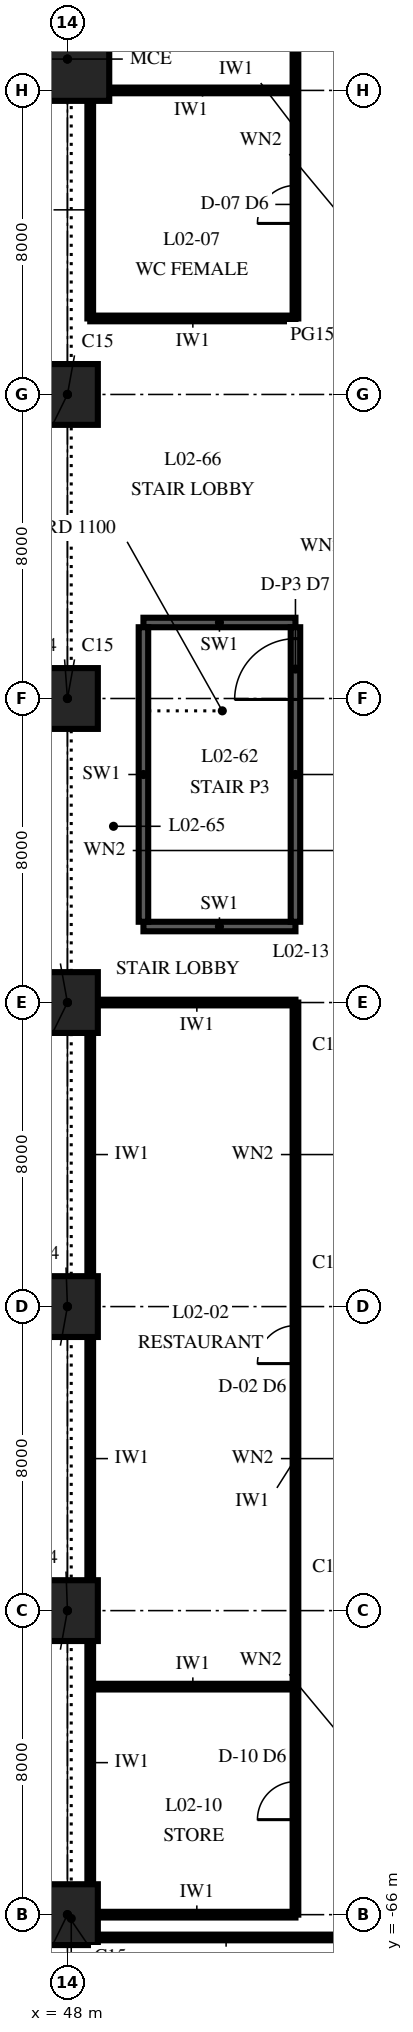
"""IFC4 building model, lengths in metres.
Left out: names, types, materials, properties, quantities, classifications, styles, units other than length and angle.
Written with IfcOpenShell. Run it as: python <this file> out.ifc"""

import sys

from ifc_helpers import new_model, si_unit, direction, frame, frame_2d, origin, origin_2d, place, context, subcontext, project, spatial, rectangle, extrude, element, fill, save


model = new_model("IFC4")
c1 = context("Model", 3, precision=1e-05, world=origin(), true_north=direction((0.0, 1.0)))
c2 = subcontext(c1, "Body", "Model", "MODEL_VIEW")
j1 = project(units=[si_unit("LENGTHUNIT", "METRE"), si_unit("PLANEANGLEUNIT", "RADIAN")], contexts=[c1])
p1 = place(None, origin())
s1 = spatial("IfcSite", under=j1, at=p1, CompositionType="ELEMENT")
p2 = place(p1, origin())
s2 = spatial("IfcBuilding", under=s1, at=p2, CompositionType="ELEMENT")
p3 = place(p2, frame((0.0, 0.0, 12.0)))
s3 = spatial("IfcBuildingStorey", under=s2, at=p3, CompositionType="ELEMENT", Elevation=12.0)
for number, where, z_axis, x_axis in (
    (1, (48.0, -66.0, 0.0), (0.0, 0.0, 1.0), (1.0, 0.0, 0.0)),
    (2, (48.0, -58.0, 0.0), (0.0, 0.0, 1.0), (1.0, 0.0, 0.0)),
    (3, (48.0, -50.0, 0.0), (0.0, 0.0, 1.0), (1.0, 0.0, 0.0)),
    (4, (48.0, -42.0, 0.0), (0.0, 0.0, 1.0), (1.0, 0.0, 0.0)),
    (5, (48.0, -34.0, 0.0), (0.0, 0.0, 1.0), (1.0, 0.0, 0.0)),
    (6, (48.0, -26.0, 0.0), (0.0, 0.0, 1.0), (1.0, 0.0, 0.0)),
):
    element("IfcColumn", number, at=place(p3, frame(where, z_axis=z_axis, x_axis=x_axis)), inside=s3, PredefinedType="COLUMN", context=c2, shape_type="SweptSolid", body=[
        extrude(rectangle(XDim=1.6, YDim=1.6, at=origin_2d()), origin(), (0.0, 0.0, 1.0), 8.108),
    ])
p4 = place(p3, frame((48.0, -17.175, 0.0), z_axis=(0.0, 0.0, 1.0), x_axis=(1.0, 0.0, 0.0)))
e7 = element("IfcColumn", 7, at=p4, inside=s3, PredefinedType="COLUMN", context=c2, shape_type="SweptSolid", body=[
    extrude(rectangle(XDim=2.2, YDim=2.2, at=origin_2d()), origin(), (0.0, 0.0, 1.0), 8.6),
])
for number, where, z_axis, x_axis in (
    (8, (50.0, -40.0, 0.0), (0.0, 0.0, 1.0), (1.0, 0.0, 0.0)),
    (9, (54.0, -32.0, 0.0), (0.0, 0.0, 1.0), (-1.0, 0.0, 0.0)),
):
    element("IfcWall", number, at=place(p3, frame(where, z_axis=z_axis, x_axis=x_axis)), inside=s3, PredefinedType="SOLIDWALL", context=c2, shape_type="SweptSolid", body=[
        extrude(rectangle(XDim=4.0, YDim=0.25, at=frame_2d((2.0, 0.0))), origin(), (0.0, 0.0, 1.0), 7.0),
    ])
p5 = place(p3, frame((54.0, -39.875, 0.0), z_axis=(0.0, 0.0, 1.0), x_axis=(0.0, 1.0, 0.0)))
e10 = element("IfcWall", 10, at=p5, inside=s3, PredefinedType="SOLIDWALL", context=c2, shape_type="SweptSolid", body=[
    extrude(rectangle(XDim=7.75, YDim=0.25, at=frame_2d((3.875, 0.0))), origin(), (0.0, 0.0, 1.0), 7.0),
])
p6 = place(p5, frame((5.85, 0.0, 0.0)))
e11 = element("IfcOpeningElement", 11, at=p6, cuts=e10, PredefinedType="OPENING", context=c2, shape_type="SweptSolid", body=[
    extrude(rectangle(XDim=1.6, YDim=2.1, at=frame_2d((0.8, 1.05))), frame((0.0, 0.14, 0.0), z_axis=(0.0, -1.0, 0.0), x_axis=(1.0, 0.0, 0.0)), (0.0, 0.0, 1.0), 0.28),
])
p7 = place(p3, frame((50.0, -32.125, 0.0), z_axis=(0.0, 0.0, 1.0), x_axis=(0.0, -1.0, 0.0)))
e12 = element("IfcWall", 12, at=p7, inside=s3, PredefinedType="SOLIDWALL", context=c2, shape_type="SweptSolid", body=[
    extrude(rectangle(XDim=7.75, YDim=0.25, at=frame_2d((3.875, 0.0))), origin(), (0.0, 0.0, 1.0), 7.0),
])
for number, where, z_axis, x_axis in (
    (13, (48.6, -65.19, 0.0), (0.0, 0.0, 1.0), (0.0, 1.0, 0.0)),
    (14, (48.6, -57.19, 0.0), (0.0, 0.0, 1.0), (0.0, 1.0, 0.0)),
):
    element("IfcWall", number, at=place(p3, frame(where, z_axis=z_axis, x_axis=x_axis)), inside=s3, PredefinedType="PARTITIONING", context=c2, shape_type="SweptSolid", body=[
        extrude(rectangle(XDim=6.38, YDim=0.15, at=frame_2d((3.19, 0.0))), origin(), (0.0, 0.0, 1.0), 5.099),
    ])
p8 = place(p3, frame((48.6, -49.19, 0.0), z_axis=(0.0, 0.0, 1.0), x_axis=(0.0, 1.0, 0.0)))
e15 = element("IfcWall", 15, at=p8, inside=s3, PredefinedType="PARTITIONING", context=c2, shape_type="SweptSolid", body=[
    extrude(rectangle(XDim=6.38, YDim=0.15, at=frame_2d((3.19, 0.0))), origin(), (0.0, 0.0, 1.0), 6.05),
])
p9 = place(p3, frame((48.6, -24.0, 0.0), z_axis=(0.0, 0.0, 1.0), x_axis=(0.0, 1.0, 0.0)))
e16 = element("IfcWall", 16, at=p9, inside=s3, PredefinedType="PARTITIONING", context=c2, shape_type="SweptSolid", body=[
    extrude(rectangle(XDim=5.715, YDim=0.15, at=frame_2d((2.857, 0.0))), origin(), (0.0, 0.0, 1.0), 6.7),
])
p10 = place(p3, frame((54.0, -66.0, 0.0), z_axis=(0.0, 0.0, 1.0), x_axis=(0.0, 1.0, 0.0)))
e17 = element("IfcWall", 17, at=p10, inside=s3, PredefinedType="PARTITIONING", context=c2, shape_type="SweptSolid", body=[
    extrude(rectangle(XDim=24.0, YDim=0.15, at=frame_2d((12.0, 0.0))), origin(), (0.0, 0.0, 1.0), 6.7),
])
p11 = place(p10, frame((2.5, 0.0, 0.0)))
e18 = element("IfcOpeningElement", 18, at=p11, cuts=e17, PredefinedType="OPENING", context=c2, shape_type="SweptSolid", body=[
    extrude(rectangle(XDim=1.0, YDim=2.1, at=frame_2d((0.5, 1.05))), frame((0.0, 0.09, 0.0), z_axis=(0.0, -1.0, 0.0), x_axis=(1.0, 0.0, 0.0)), (0.0, 0.0, 1.0), 0.18),
])
p12 = place(p10, frame((14.5, 0.0, 0.0)))
e19 = element("IfcOpeningElement", 19, at=p12, cuts=e17, PredefinedType="OPENING", context=c2, shape_type="SweptSolid", body=[
    extrude(rectangle(XDim=1.0, YDim=2.1, at=frame_2d((0.5, 1.05))), frame((0.0, 0.09, 0.0), z_axis=(0.0, -1.0, 0.0), x_axis=(1.0, 0.0, 0.0)), (0.0, 0.0, 1.0), 0.18),
])
p13 = place(p3, frame((54.0, -24.0, 0.0), z_axis=(0.0, 0.0, 1.0), x_axis=(0.0, 1.0, 0.0)))
e20 = element("IfcWall", 20, at=p13, inside=s3, PredefinedType="PARTITIONING", context=c2, shape_type="SweptSolid", body=[
    extrude(rectangle(XDim=10.0, YDim=0.15, at=frame_2d((5.0, 0.0))), origin(), (0.0, 0.0, 1.0), 6.7),
])
p14 = place(p13, frame((2.5, 0.0, 0.0)))
e21 = element("IfcOpeningElement", 21, at=p14, cuts=e20, PredefinedType="OPENING", context=c2, shape_type="SweptSolid", body=[
    extrude(rectangle(XDim=1.0, YDim=2.1, at=frame_2d((0.5, 1.05))), frame((0.0, 0.09, 0.0), z_axis=(0.0, -1.0, 0.0), x_axis=(1.0, 0.0, 0.0)), (0.0, 0.0, 1.0), 0.18),
])
p15 = place(p13, frame((7.5, 0.0, 0.0)))
e22 = element("IfcOpeningElement", 22, at=p15, cuts=e20, PredefinedType="OPENING", context=c2, shape_type="SweptSolid", body=[
    extrude(rectangle(XDim=1.0, YDim=2.1, at=frame_2d((0.5, 1.05))), frame((0.0, 0.09, 0.0), z_axis=(0.0, -1.0, 0.0), x_axis=(1.0, 0.0, 0.0)), (0.0, 0.0, 1.0), 0.18),
])
p16 = place(p3, frame((48.81, -66.6, 0.0), z_axis=(0.0, 0.0, 1.0), x_axis=(1.0, 0.0, 0.0)))
e23 = element("IfcWall", 23, at=p16, inside=s3, PredefinedType="PARTITIONING", context=c2, shape_type="SweptSolid", body=[
    extrude(rectangle(XDim=6.73, YDim=0.15, at=frame_2d((3.365, 0.0))), origin(), (0.0, 0.0, 1.0), 5.099),
])
p17 = place(p3, frame((48.81, -66.0, 0.0), z_axis=(0.0, 0.0, 1.0), x_axis=(1.0, 0.0, 0.0)))
e24 = element("IfcWall", 24, at=p17, inside=s3, PredefinedType="PARTITIONING", context=c2, shape_type="SweptSolid", body=[
    extrude(rectangle(XDim=5.19, YDim=0.15, at=frame_2d((2.595, 0.0))), origin(), (0.0, 0.0, 1.0), 5.099),
])
p18 = place(p3, frame((48.6, -60.0, 0.0), z_axis=(0.0, 0.0, 1.0), x_axis=(1.0, 0.0, 0.0)))
e25 = element("IfcWall", 25, at=p18, inside=s3, PredefinedType="PARTITIONING", context=c2, shape_type="SweptSolid", body=[
    extrude(rectangle(XDim=5.4, YDim=0.15, at=frame_2d((2.7, 0.0))), origin(), (0.0, 0.0, 1.0), 6.7),
])
p19 = place(p3, frame((48.81, -42.0, 0.0), z_axis=(0.0, 0.0, 1.0), x_axis=(1.0, 0.0, 0.0)))
e26 = element("IfcWall", 26, at=p19, inside=s3, PredefinedType="PARTITIONING", context=c2, shape_type="SweptSolid", body=[
    extrude(rectangle(XDim=5.19, YDim=0.15, at=frame_2d((2.595, 0.0))), origin(), (0.0, 0.0, 1.0), 5.099),
])
p20 = place(p3, frame((48.6, -24.0, 0.0), z_axis=(0.0, 0.0, 1.0), x_axis=(1.0, 0.0, 0.0)))
e27 = element("IfcWall", 27, at=p20, inside=s3, PredefinedType="PARTITIONING", context=c2, shape_type="SweptSolid", body=[
    extrude(rectangle(XDim=5.4, YDim=0.15, at=frame_2d((2.7, 0.0))), origin(), (0.0, 0.0, 1.0), 6.7),
])
p21 = place(p3, frame((49.11, -18.0, 0.0), z_axis=(0.0, 0.0, 1.0), x_axis=(1.0, 0.0, 0.0)))
e28 = element("IfcWall", 28, at=p21, inside=s3, PredefinedType="PARTITIONING", context=c2, shape_type="SweptSolid", body=[
    extrude(rectangle(XDim=4.89, YDim=0.15, at=frame_2d((2.445, 0.0))), origin(), (0.0, 0.0, 1.0), 6.7),
])
p22 = place(p6, origin())
e29 = element("IfcDoor", 29, at=p22, inside=s3, OperationType="DOUBLE_DOOR_SINGLE_SWING", PredefinedType="DOOR", context=c2, shape_type="SweptSolid", body=[
    extrude(rectangle(XDim=1.6, YDim=2.1, at=frame_2d((0.8, 1.05))), frame((0.0, 0.125, 0.0), z_axis=(0.0, -1.0, 0.0), x_axis=(1.0, 0.0, 0.0)), (0.0, 0.0, 1.0), 0.25),
])
fill(e11, e29)
p23 = place(p11, origin())
e30 = element("IfcDoor", 30, at=p23, inside=s3, OperationType="SINGLE_SWING_LEFT", PredefinedType="DOOR", context=c2, shape_type="SweptSolid", body=[
    extrude(rectangle(XDim=1.0, YDim=2.1, at=frame_2d((0.5, 1.05))), frame((0.0, 0.075, 0.0), z_axis=(0.0, -1.0, 0.0), x_axis=(1.0, 0.0, 0.0)), (0.0, 0.0, 1.0), 0.149),
])
fill(e18, e30)
p24 = place(p12, origin())
e31 = element("IfcDoor", 31, at=p24, inside=s3, OperationType="SINGLE_SWING_LEFT", PredefinedType="DOOR", context=c2, shape_type="SweptSolid", body=[
    extrude(rectangle(XDim=1.0, YDim=2.1, at=frame_2d((0.5, 1.05))), frame((0.0, 0.075, 0.0), z_axis=(0.0, -1.0, 0.0), x_axis=(1.0, 0.0, 0.0)), (0.0, 0.0, 1.0), 0.149),
])
fill(e19, e31)
p25 = place(p14, origin())
e32 = element("IfcDoor", 32, at=p25, inside=s3, OperationType="SINGLE_SWING_LEFT", PredefinedType="DOOR", context=c2, shape_type="SweptSolid", body=[
    extrude(rectangle(XDim=1.0, YDim=2.1, at=frame_2d((0.5, 1.05))), frame((0.0, 0.075, 0.0), z_axis=(0.0, -1.0, 0.0), x_axis=(1.0, 0.0, 0.0)), (0.0, 0.0, 1.0), 0.149),
])
fill(e21, e32)
save(model, sys.argv[1])
